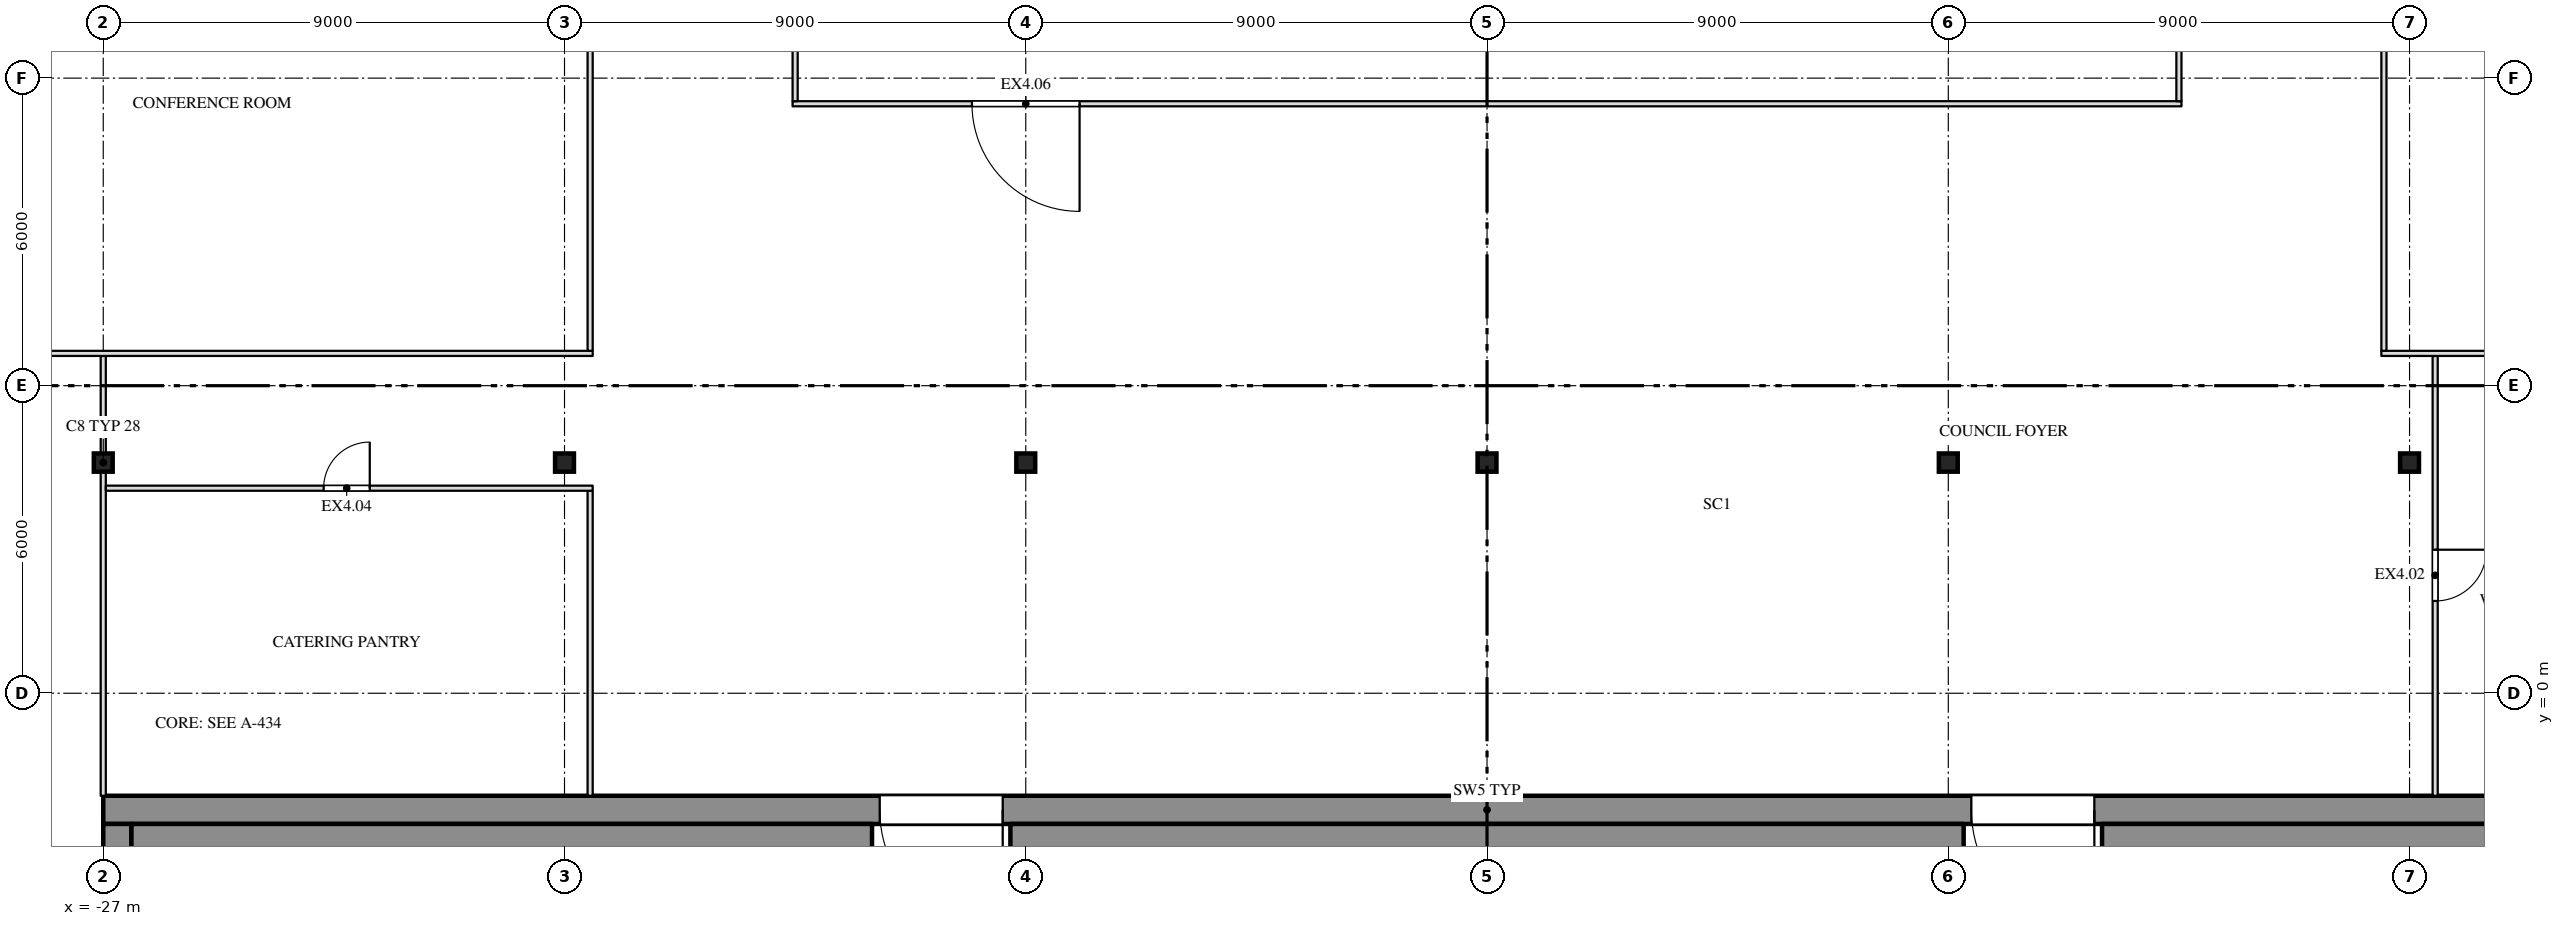
"""IFC4 building model, lengths in metres.
Left out: names, types, materials, properties, quantities, classifications, styles, units other than length and angle.
Written with IfcOpenShell. Run it as: python <this file> out.ifc"""

import sys

from ifc_helpers import new_model, si_unit, direction, frame, frame_2d, origin, origin_2d, place, context, subcontext, project, spatial, rectangle, i_section, extrude, element, fill, save


model = new_model("IFC4")
c1 = context("Model", 3, precision=1e-05, world=origin(), true_north=direction((0.0, 1.0)))
c2 = subcontext(c1, "Body", "Model", "MODEL_VIEW")
j1 = project(units=[si_unit("LENGTHUNIT", "METRE"), si_unit("PLANEANGLEUNIT", "RADIAN")], contexts=[c1])
p1 = place(None, origin())
s1 = spatial("IfcSite", under=j1, at=p1, CompositionType="ELEMENT")
p2 = place(p1, origin())
s2 = spatial("IfcBuilding", under=s1, at=p2, CompositionType="ELEMENT")
p3 = place(p2, frame((0.0, 0.0, 284.5)))
s3 = spatial("IfcBuildingStorey", under=s2, at=p3, CompositionType="ELEMENT", Elevation=284.5)
for number, where, z_axis, x_axis in (
    (1, (-27.0, 4.5, 0.0), (0.0, 0.0, 1.0), (1.0, 0.0, 0.0)),
    (2, (-18.0, 4.5, 0.0), (0.0, 0.0, 1.0), (1.0, 0.0, 0.0)),
    (3, (-9.0, 4.5, 0.0), (0.0, 0.0, 1.0), (1.0, 0.0, 0.0)),
    (4, (0.0, 4.5, 0.0), (0.0, 0.0, 1.0), (1.0, 0.0, 0.0)),
    (5, (9.0, 4.5, 0.0), (0.0, 0.0, 1.0), (1.0, 0.0, 0.0)),
    (6, (18.0, 4.5, 0.0), (0.0, 0.0, 1.0), (1.0, 0.0, 0.0)),
):
    element("IfcColumn", number, at=place(p3, frame(where, z_axis=z_axis, x_axis=x_axis)), inside=s3, PredefinedType="COLUMN", context=c2, shape_type="SweptSolid", body=[
        extrude(i_section(OverallWidth=0.368, OverallDepth=0.356, WebThickness=0.011, FlangeThickness=0.018, at=origin_2d()), origin(), (0.0, 0.0, 1.0), 4.0),
    ])
p4 = place(p3, frame((-27.0, -2.275, 0.0), z_axis=(0.0, 0.0, 1.0), x_axis=(1.0, 0.0, 0.0)))
e7 = element("IfcWall", 7, at=p4, inside=s3, PredefinedType="SHEAR", context=c2, shape_type="SweptSolid", body=[
    extrude(rectangle(XDim=54.0, YDim=0.55, at=frame_2d((27.0, 0.0))), origin(), (0.0, 0.0, 1.0), 3.78),
])
p5 = place(p4, frame((15.15, 0.0, 0.0)))
e8 = element("IfcOpeningElement", 8, at=p5, cuts=e7, PredefinedType="OPENING", context=c2, shape_type="SweptSolid", body=[
    extrude(rectangle(XDim=2.4, YDim=2.1, at=frame_2d((1.2, 1.05))), frame((0.0, 0.287, 0.0), z_axis=(0.0, -1.0, 0.0), x_axis=(1.0, 0.0, 0.0)), (0.0, 0.0, 1.0), 0.574),
])
p6 = place(p4, frame((36.45, 0.0, 0.0)))
e9 = element("IfcOpeningElement", 9, at=p6, cuts=e7, PredefinedType="OPENING", context=c2, shape_type="SweptSolid", body=[
    extrude(rectangle(XDim=2.4, YDim=2.1, at=frame_2d((1.2, 1.05))), frame((0.0, 0.287, 0.0), z_axis=(0.0, -1.0, 0.0), x_axis=(1.0, 0.0, 0.0)), (0.0, 0.0, 1.0), 0.574),
])
p7 = place(p3, frame((-26.725, -13.45, 0.0), z_axis=(0.0, 0.0, 1.0), x_axis=(0.0, 1.0, 0.0)))
e10 = element("IfcWall", 10, at=p7, inside=s3, PredefinedType="SHEAR", context=c2, shape_type="SweptSolid", body=[
    extrude(rectangle(XDim=10.9, YDim=0.55, at=frame_2d((5.45, 0.0))), origin(), (0.0, 0.0, 1.0), 3.78),
])
p8 = place(p7, frame((4.662, 0.0, 0.0)))
e11 = element("IfcOpeningElement", 11, at=p8, cuts=e10, PredefinedType="OPENING", context=c2, shape_type="SweptSolid", body=[
    extrude(rectangle(XDim=2.4, YDim=2.1, at=frame_2d((1.2, 1.05))), frame((0.0, 0.287, 0.0), z_axis=(0.0, -1.0, 0.0), x_axis=(1.0, 0.0, 0.0)), (0.0, 0.0, 1.0), 0.574),
])
p9 = place(p3, frame((-26.45, -2.875, 0.0), z_axis=(0.0, 0.0, 1.0), x_axis=(1.0, 0.0, 0.0)))
e12 = element("IfcWall", 12, at=p9, inside=s3, PredefinedType="SHEAR", context=c2, shape_type="SweptSolid", body=[
    extrude(rectangle(XDim=14.45, YDim=0.65, at=frame_2d((7.225, 0.0))), origin(), (0.0, 0.0, 1.0), 3.78),
])
p10 = place(p3, frame((-9.3, -2.875, 0.0), z_axis=(0.0, 0.0, 1.0), x_axis=(1.0, 0.0, 0.0)))
e13 = element("IfcWall", 13, at=p10, inside=s3, PredefinedType="SHEAR", context=c2, shape_type="SweptSolid", body=[
    extrude(rectangle(XDim=18.6, YDim=0.65, at=frame_2d((9.3, 0.0))), origin(), (0.0, 0.0, 1.0), 3.78),
])
p11 = place(p3, frame((12.0, -2.875, 0.0), z_axis=(0.0, 0.0, 1.0), x_axis=(1.0, 0.0, 0.0)))
e14 = element("IfcWall", 14, at=p11, inside=s3, PredefinedType="SHEAR", context=c2, shape_type="SweptSolid", body=[
    extrude(rectangle(XDim=14.45, YDim=0.65, at=frame_2d((7.225, 0.0))), origin(), (0.0, 0.0, 1.0), 3.78),
])
p12 = place(p3, frame((-27.0, -2.0, 0.0), z_axis=(0.0, 0.0, 1.0), x_axis=(0.0, 1.0, 0.0)))
e15 = element("IfcWall", 15, at=p12, inside=s3, PredefinedType="PARTITIONING", context=c2, shape_type="SweptSolid", body=[
    extrude(rectangle(XDim=6.322, YDim=0.1, at=frame_2d((3.161, 0.0))), origin(), (0.0, 0.0, 1.0), 3.247),
])
p13 = place(p3, frame((-27.0, 4.678, 0.0), z_axis=(0.0, 0.0, 1.0), x_axis=(0.0, 1.0, 0.0)))
e16 = element("IfcWall", 16, at=p13, inside=s3, PredefinedType="PARTITIONING", context=c2, shape_type="SweptSolid", body=[
    extrude(rectangle(XDim=1.902, YDim=0.1, at=frame_2d((0.951, 0.0))), origin(), (0.0, 0.0, 1.0), 3.247),
])
p14 = place(p3, frame((-17.5, -2.0, 0.0), z_axis=(0.0, 0.0, 1.0), x_axis=(0.0, 1.0, 0.0)))
e17 = element("IfcWall", 17, at=p14, inside=s3, PredefinedType="PARTITIONING", context=c2, shape_type="SweptSolid", body=[
    extrude(rectangle(XDim=5.95, YDim=0.1, at=frame_2d((2.975, 0.0))), origin(), (0.0, 0.0, 1.0), 3.78),
])
p15 = place(p3, frame((18.5, -2.0, 0.0), z_axis=(0.0, 0.0, 1.0), x_axis=(0.0, 1.0, 0.0)))
e18 = element("IfcWall", 18, at=p15, inside=s3, PredefinedType="PARTITIONING", context=c2, shape_type="SweptSolid", body=[
    extrude(rectangle(XDim=8.58, YDim=0.1, at=frame_2d((4.29, 0.0))), origin(), (0.0, 0.0, 1.0), 3.78),
])
p16 = place(p15, frame((3.8, 0.0, 0.0)))
e19 = element("IfcOpeningElement", 19, at=p16, cuts=e18, PredefinedType="OPENING", context=c2, shape_type="SweptSolid", body=[
    extrude(rectangle(XDim=1.0, YDim=2.1, at=frame_2d((0.5, 1.05))), frame((0.0, 0.062, 0.0), z_axis=(0.0, -1.0, 0.0), x_axis=(1.0, 0.0, 0.0)), (0.0, 0.0, 1.0), 0.124),
])
p17 = place(p3, frame((-26.95, 4.0, 0.0), z_axis=(0.0, 0.0, 1.0), x_axis=(1.0, 0.0, 0.0)))
e20 = element("IfcWall", 20, at=p17, inside=s3, PredefinedType="PARTITIONING", context=c2, shape_type="SweptSolid", body=[
    extrude(rectangle(XDim=9.5, YDim=0.1, at=frame_2d((4.75, 0.0))), origin(), (0.0, 0.0, 1.0), 3.78),
])
p18 = place(p17, frame((4.25, 0.0, 0.0)))
e21 = element("IfcOpeningElement", 21, at=p18, cuts=e20, PredefinedType="OPENING", context=c2, shape_type="SweptSolid", body=[
    extrude(rectangle(XDim=0.9, YDim=2.1, at=frame_2d((0.45, 1.05))), frame((0.0, 0.062, 0.0), z_axis=(0.0, -1.0, 0.0), x_axis=(1.0, 0.0, 0.0)), (0.0, 0.0, 1.0), 0.124),
])
p19 = place(p3, frame((-32.2, 6.63, 0.0), z_axis=(0.0, 0.0, 1.0), x_axis=(1.0, 0.0, 0.0)))
e22 = element("IfcWall", 22, at=p19, inside=s3, PredefinedType="PARTITIONING", context=c2, shape_type="SweptSolid", body=[
    extrude(rectangle(XDim=14.75, YDim=0.1, at=frame_2d((7.375, 0.0))), origin(), (0.0, 0.0, 1.0), 3.78),
])
p20 = place(p3, frame((-17.5, 6.68, 0.0), z_axis=(0.0, 0.0, 1.0), x_axis=(0.0, 1.0, 0.0)))
e23 = element("IfcWall", 23, at=p20, inside=s3, PredefinedType="PARTITIONING", context=c2, shape_type="SweptSolid", body=[
    extrude(rectangle(XDim=29.52, YDim=0.1, at=frame_2d((14.76, 0.0))), origin(), (0.0, 0.0, 1.0), 3.78),
])
p21 = place(p20, frame((5.92, 0.0, 0.0)))
e24 = element("IfcOpeningElement", 24, at=p21, cuts=e23, PredefinedType="OPENING", context=c2, shape_type="SweptSolid", body=[
    extrude(rectangle(XDim=0.9, YDim=2.1, at=frame_2d((0.45, 1.05))), frame((0.0, 0.062, 0.0), z_axis=(0.0, -1.0, 0.0), x_axis=(1.0, 0.0, 0.0)), (0.0, 0.0, 1.0), 0.124),
])
p22 = place(p20, frame((13.04, 0.0, 0.0)))
e25 = element("IfcOpeningElement", 25, at=p22, cuts=e23, PredefinedType="OPENING", context=c2, shape_type="SweptSolid", body=[
    extrude(rectangle(XDim=1.8, YDim=2.1, at=frame_2d((0.9, 1.05))), frame((0.0, 0.062, 0.0), z_axis=(0.0, -1.0, 0.0), x_axis=(1.0, 0.0, 0.0)), (0.0, 0.0, 1.0), 0.124),
])
p23 = place(p20, frame((24.03, 0.0, 0.0)))
e26 = element("IfcOpeningElement", 26, at=p23, cuts=e23, PredefinedType="OPENING", context=c2, shape_type="SweptSolid", body=[
    extrude(rectangle(XDim=0.9, YDim=2.1, at=frame_2d((0.45, 1.05))), frame((0.0, 0.062, 0.0), z_axis=(0.0, -1.0, 0.0), x_axis=(1.0, 0.0, 0.0)), (0.0, 0.0, 1.0), 0.124),
])
p24 = place(p3, frame((17.45, 6.63, 0.0), z_axis=(0.0, 0.0, 1.0), x_axis=(1.0, 0.0, 0.0)))
e27 = element("IfcWall", 27, at=p24, inside=s3, PredefinedType="PARTITIONING", context=c2, shape_type="SweptSolid", body=[
    extrude(rectangle(XDim=14.75, YDim=0.1, at=frame_2d((7.375, 0.0))), origin(), (0.0, 0.0, 1.0), 3.78),
])
p25 = place(p3, frame((17.5, 6.68, 0.0), z_axis=(0.0, 0.0, 1.0), x_axis=(0.0, 1.0, 0.0)))
e28 = element("IfcWall", 28, at=p25, inside=s3, PredefinedType="PARTITIONING", context=c2, shape_type="SweptSolid", body=[
    extrude(rectangle(XDim=29.52, YDim=0.1, at=frame_2d((14.76, 0.0))), origin(), (0.0, 0.0, 1.0), 3.78),
])
p26 = place(p25, frame((9.22, 0.0, 0.0)))
e29 = element("IfcOpeningElement", 29, at=p26, cuts=e28, PredefinedType="OPENING", context=c2, shape_type="SweptSolid", body=[
    extrude(rectangle(XDim=0.9, YDim=2.1, at=frame_2d((0.45, 1.05))), frame((0.0, 0.062, 0.0), z_axis=(0.0, -1.0, 0.0), x_axis=(1.0, 0.0, 0.0)), (0.0, 0.0, 1.0), 0.124),
])
p27 = place(p25, frame((16.56, 0.0, 0.0)))
e30 = element("IfcOpeningElement", 30, at=p27, cuts=e28, PredefinedType="OPENING", context=c2, shape_type="SweptSolid", body=[
    extrude(rectangle(XDim=0.9, YDim=2.1, at=frame_2d((0.45, 1.05))), frame((0.0, 0.062, 0.0), z_axis=(0.0, -1.0, 0.0), x_axis=(1.0, 0.0, 0.0)), (0.0, 0.0, 1.0), 0.124),
])
p28 = place(p3, frame((-13.55, 11.5, 0.0), z_axis=(0.0, 0.0, 1.0), x_axis=(1.0, 0.0, 0.0)))
e31 = element("IfcWall", 31, at=p28, inside=s3, PredefinedType="PARTITIONING", context=c2, shape_type="SweptSolid", body=[
    extrude(rectangle(XDim=27.1, YDim=0.1, at=frame_2d((13.55, 0.0))), origin(), (0.0, 0.0, 1.0), 3.78),
])
p29 = place(p28, frame((3.5, 0.0, 0.0)))
e32 = element("IfcOpeningElement", 32, at=p29, cuts=e31, PredefinedType="OPENING", context=c2, shape_type="SweptSolid", body=[
    extrude(rectangle(XDim=2.1, YDim=2.4, at=frame_2d((1.05, 1.2))), frame((0.0, 0.062, 0.0), z_axis=(0.0, -1.0, 0.0), x_axis=(1.0, 0.0, 0.0)), (0.0, 0.0, 1.0), 0.124),
])
p30 = place(p3, frame((-13.5, 11.55, 0.0), z_axis=(0.0, 0.0, 1.0), x_axis=(0.0, 1.0, 0.0)))
e33 = element("IfcWall", 33, at=p30, inside=s3, PredefinedType="PARTITIONING", context=c2, shape_type="SweptSolid", body=[
    extrude(rectangle(XDim=14.51, YDim=0.1, at=frame_2d((7.255, 0.0))), origin(), (0.0, 0.0, 1.0), 3.247),
])
p31 = place(p30, frame((8.4, 0.0, 0.0)))
e34 = element("IfcOpeningElement", 34, at=p31, cuts=e33, PredefinedType="OPENING", context=c2, shape_type="SweptSolid", body=[
    extrude(rectangle(XDim=2.1, YDim=2.4, at=frame_2d((1.05, 1.2))), frame((0.0, 0.062, 0.0), z_axis=(0.0, -1.0, 0.0), x_axis=(1.0, 0.0, 0.0)), (0.0, 0.0, 1.0), 0.124),
])
p32 = place(p3, frame((13.5, 11.55, 0.0), z_axis=(0.0, 0.0, 1.0), x_axis=(0.0, 1.0, 0.0)))
e35 = element("IfcWall", 35, at=p32, inside=s3, PredefinedType="PARTITIONING", context=c2, shape_type="SweptSolid", body=[
    extrude(rectangle(XDim=14.51, YDim=0.1, at=frame_2d((7.255, 0.0))), origin(), (0.0, 0.0, 1.0), 3.247),
])
p33 = place(p32, frame((8.4, 0.0, 0.0)))
e36 = element("IfcOpeningElement", 36, at=p33, cuts=e35, PredefinedType="OPENING", context=c2, shape_type="SweptSolid", body=[
    extrude(rectangle(XDim=2.1, YDim=2.4, at=frame_2d((1.05, 1.2))), frame((0.0, 0.062, 0.0), z_axis=(0.0, -1.0, 0.0), x_axis=(1.0, 0.0, 0.0)), (0.0, 0.0, 1.0), 0.124),
])
p34 = place(p16, origin())
e37 = element("IfcDoor", 37, at=p34, inside=s3, OperationType="SINGLE_SWING_LEFT", PredefinedType="DOOR", context=c2, shape_type="SweptSolid", body=[
    extrude(rectangle(XDim=1.0, YDim=2.1, at=frame_2d((0.5, 1.05))), frame((0.0, 0.025, 0.0), z_axis=(0.0, -1.0, 0.0), x_axis=(1.0, 0.0, 0.0)), (0.0, 0.0, 1.0), 0.05),
])
fill(e19, e37)
p35 = place(p18, origin())
e38 = element("IfcDoor", 38, at=p35, inside=s3, OperationType="SINGLE_SWING_RIGHT", PredefinedType="DOOR", context=c2, shape_type="SweptSolid", body=[
    extrude(rectangle(XDim=0.9, YDim=2.1, at=frame_2d((0.45, 1.05))), frame((0.0, 0.025, 0.0), z_axis=(0.0, -1.0, 0.0), x_axis=(1.0, 0.0, 0.0)), (0.0, 0.0, 1.0), 0.05),
])
fill(e21, e38)
p36 = place(p29, origin())
e39 = element("IfcDoor", 39, at=p36, inside=s3, OperationType="DOUBLE_DOOR_SINGLE_SWING", PredefinedType="DOOR", context=c2, shape_type="SweptSolid", body=[
    extrude(rectangle(XDim=2.1, YDim=2.4, at=frame_2d((1.05, 1.2))), frame((0.0, 0.025, 0.0), z_axis=(0.0, -1.0, 0.0), x_axis=(1.0, 0.0, 0.0)), (0.0, 0.0, 1.0), 0.05),
])
fill(e32, e39)
p37 = place(p5, origin())
e40 = element("IfcDoor", 40, at=p37, inside=s3, OperationType="DOUBLE_DOOR_SINGLE_SWING", PredefinedType="DOOR", context=c2, shape_type="SweptSolid", body=[
    extrude(rectangle(XDim=2.4, YDim=2.1, at=frame_2d((1.2, 1.05))), frame((0.0, 0.025, 0.0), z_axis=(0.0, -1.0, 0.0), x_axis=(1.0, 0.0, 0.0)), (0.0, 0.0, 1.0), 0.05),
])
fill(e8, e40)
p38 = place(p6, origin())
e41 = element("IfcDoor", 41, at=p38, inside=s3, OperationType="DOUBLE_DOOR_SINGLE_SWING", PredefinedType="DOOR", context=c2, shape_type="SweptSolid", body=[
    extrude(rectangle(XDim=2.4, YDim=2.1, at=frame_2d((1.2, 1.05))), frame((0.0, 0.025, 0.0), z_axis=(0.0, -1.0, 0.0), x_axis=(1.0, 0.0, 0.0)), (0.0, 0.0, 1.0), 0.05),
])
fill(e9, e41)
save(model, sys.argv[1])
